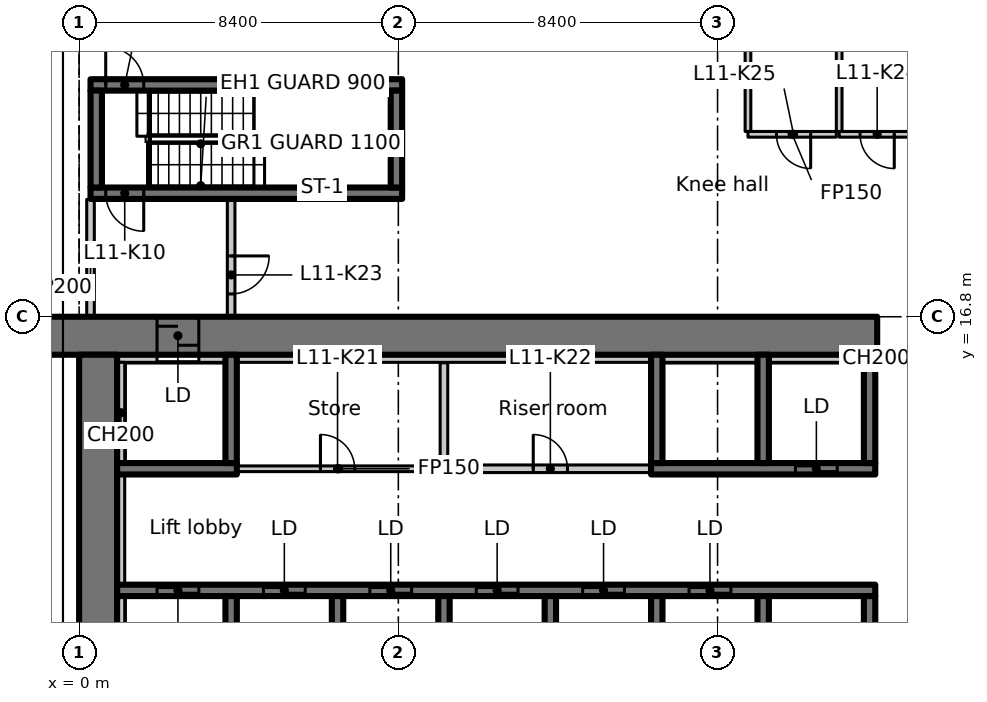
"""IFC4 building model, lengths in metres.
Left out: names, types, materials, properties, quantities, classifications, styles, units other than length and angle.
Written with IfcOpenShell. Run it as: python <this file> out.ifc"""

import sys

from ifc_helpers import new_model, si_unit, direction, frame, frame_2d, origin, place, context, subcontext, project, spatial, rectangle, extrude, element, fill, save


model = new_model("IFC4")
c1 = context("Model", 3, precision=1e-05, world=origin(), true_north=direction((0.0, 1.0)))
c2 = subcontext(c1, "Body", "Model", "MODEL_VIEW")
j1 = project(units=[si_unit("LENGTHUNIT", "METRE"), si_unit("PLANEANGLEUNIT", "RADIAN")], contexts=[c1])
p1 = place(None, origin())
s1 = spatial("IfcSite", under=j1, at=p1, CompositionType="ELEMENT")
p2 = place(p1, origin())
s2 = spatial("IfcBuilding", under=s1, at=p2, CompositionType="ELEMENT")
p3 = place(p2, frame((0.0, 0.0, 54.5)))
s3 = spatial("IfcBuildingStorey", under=s2, at=p3, CompositionType="ELEMENT", Elevation=54.5)
p4 = place(p3, frame((-1.1, 16.3, 0.0), z_axis=(0.0, 0.0, 1.0), x_axis=(1.0, 0.0, 0.0)))
e1 = element("IfcWall", 1, at=p4, inside=s3, PredefinedType="SHEAR", context=c2, shape_type="SweptSolid", body=[
    extrude(rectangle(XDim=22.1, YDim=1.0, at=frame_2d((11.05, 0.0))), origin(), (0.0, 0.0, 1.0), 3.35),
])
p5 = place(p4, frame((3.15, 0.0, 0.0)))
e2 = element("IfcOpeningElement", 2, at=p5, cuts=e1, PredefinedType="OPENING", context=c2, shape_type="SweptSolid", body=[
    extrude(rectangle(XDim=1.1, YDim=2.3, at=frame_2d((0.55, 1.15))), frame((0.0, 0.51, 0.0), z_axis=(0.0, -1.0, 0.0), x_axis=(1.0, 0.0, 0.0)), (0.0, 0.0, 1.0), 1.02),
])
p6 = place(p3, frame((0.5, 6.936, 0.0), z_axis=(0.0, 0.0, 1.0), x_axis=(0.0, 1.0, 0.0)))
e3 = element("IfcWall", 3, at=p6, inside=s3, PredefinedType="SHEAR", context=c2, shape_type="SweptSolid", body=[
    extrude(rectangle(XDim=8.864, YDim=1.0, at=frame_2d((4.432, 0.0))), origin(), (0.0, 0.0, 1.0), 3.35),
])
p7 = place(p3, frame((1.0, 15.7, 0.0), z_axis=(0.0, 0.0, 1.0), x_axis=(1.0, 0.0, 0.0)))
e4 = element("IfcWall", 4, at=p7, inside=s3, PredefinedType="PARTITIONING", context=c2, shape_type="SweptSolid", body=[
    extrude(rectangle(XDim=1.05, YDim=0.2, at=frame_2d((0.525, 0.0))), origin(), (0.0, 0.0, 1.0), 3.35),
])
p8 = place(p3, frame((1.0, 9.6, 0.0), z_axis=(0.0, 0.0, 1.0), x_axis=(1.0, 0.0, 0.0)))
e5 = element("IfcWall", 5, at=p8, inside=s3, PredefinedType="SHEAR", context=c2, shape_type="SweptSolid", body=[
    extrude(rectangle(XDim=19.95, YDim=0.3, at=frame_2d((9.975, 0.0))), origin(), (0.0, 0.0, 1.0), 3.35),
])
p9 = place(p8, frame((1.05, 0.0, 0.0)))
e6 = element("IfcOpeningElement", 6, at=p9, cuts=e5, PredefinedType="OPENING", context=c2, shape_type="SweptSolid", body=[
    extrude(rectangle(XDim=1.1, YDim=2.3, at=frame_2d((0.55, 1.15))), frame((0.0, 0.16, 0.0), z_axis=(0.0, -1.0, 0.0), x_axis=(1.0, 0.0, 0.0)), (0.0, 0.0, 1.0), 0.32),
])
p10 = place(p8, frame((3.85, 0.0, 0.0)))
e7 = element("IfcOpeningElement", 7, at=p10, cuts=e5, PredefinedType="OPENING", context=c2, shape_type="SweptSolid", body=[
    extrude(rectangle(XDim=1.1, YDim=2.3, at=frame_2d((0.55, 1.15))), frame((0.0, 0.16, 0.0), z_axis=(0.0, -1.0, 0.0), x_axis=(1.0, 0.0, 0.0)), (0.0, 0.0, 1.0), 0.32),
])
p11 = place(p8, frame((6.65, 0.0, 0.0)))
e8 = element("IfcOpeningElement", 8, at=p11, cuts=e5, PredefinedType="OPENING", context=c2, shape_type="SweptSolid", body=[
    extrude(rectangle(XDim=1.1, YDim=2.3, at=frame_2d((0.55, 1.15))), frame((0.0, 0.16, 0.0), z_axis=(0.0, -1.0, 0.0), x_axis=(1.0, 0.0, 0.0)), (0.0, 0.0, 1.0), 0.32),
])
p12 = place(p8, frame((9.45, 0.0, 0.0)))
e9 = element("IfcOpeningElement", 9, at=p12, cuts=e5, PredefinedType="OPENING", context=c2, shape_type="SweptSolid", body=[
    extrude(rectangle(XDim=1.1, YDim=2.3, at=frame_2d((0.55, 1.15))), frame((0.0, 0.16, 0.0), z_axis=(0.0, -1.0, 0.0), x_axis=(1.0, 0.0, 0.0)), (0.0, 0.0, 1.0), 0.32),
])
p13 = place(p8, frame((12.25, 0.0, 0.0)))
e10 = element("IfcOpeningElement", 10, at=p13, cuts=e5, PredefinedType="OPENING", context=c2, shape_type="SweptSolid", body=[
    extrude(rectangle(XDim=1.1, YDim=2.3, at=frame_2d((0.55, 1.15))), frame((0.0, 0.16, 0.0), z_axis=(0.0, -1.0, 0.0), x_axis=(1.0, 0.0, 0.0)), (0.0, 0.0, 1.0), 0.32),
])
p14 = place(p8, frame((15.05, 0.0, 0.0)))
e11 = element("IfcOpeningElement", 11, at=p14, cuts=e5, PredefinedType="OPENING", context=c2, shape_type="SweptSolid", body=[
    extrude(rectangle(XDim=1.1, YDim=2.3, at=frame_2d((0.55, 1.15))), frame((0.0, 0.16, 0.0), z_axis=(0.0, -1.0, 0.0), x_axis=(1.0, 0.0, 0.0)), (0.0, 0.0, 1.0), 0.32),
])
for number, where, z_axis, x_axis in (
    (12, (4.0, 7.15, 0.0), (0.0, 0.0, 1.0), (0.0, 1.0, 0.0)),
    (13, (6.8, 7.15, 0.0), (0.0, 0.0, 1.0), (0.0, 1.0, 0.0)),
    (14, (9.6, 7.15, 0.0), (0.0, 0.0, 1.0), (0.0, 1.0, 0.0)),
    (15, (12.4, 7.15, 0.0), (0.0, 0.0, 1.0), (0.0, 1.0, 0.0)),
    (16, (15.2, 7.15, 0.0), (0.0, 0.0, 1.0), (0.0, 1.0, 0.0)),
    (17, (18.0, 7.15, 0.0), (0.0, 0.0, 1.0), (0.0, 1.0, 0.0)),
    (18, (20.8, 7.15, 0.0), (0.0, 0.0, 1.0), (0.0, 1.0, 0.0)),
):
    element("IfcWall", number, at=place(p3, frame(where, z_axis=z_axis, x_axis=x_axis)), inside=s3, PredefinedType="SHEAR", context=c2, shape_type="SweptSolid", body=[
        extrude(rectangle(XDim=2.3, YDim=0.3, at=frame_2d((1.15, 0.0))), origin(), (0.0, 0.0, 1.0), 3.35),
    ])
p15 = place(p3, frame((1.0, 12.8, 0.0), z_axis=(0.0, 0.0, 1.0), x_axis=(1.0, 0.0, 0.0)))
e19 = element("IfcWall", 19, at=p15, inside=s3, PredefinedType="SHEAR", context=c2, shape_type="SweptSolid", body=[
    extrude(rectangle(XDim=3.15, YDim=0.3, at=frame_2d((1.575, 0.0))), origin(), (0.0, 0.0, 1.0), 3.35),
])
p16 = place(p3, frame((4.0, 12.95, 0.0), z_axis=(0.0, 0.0, 1.0), x_axis=(0.0, 1.0, 0.0)))
e20 = element("IfcWall", 20, at=p16, inside=s3, PredefinedType="SHEAR", context=c2, shape_type="SweptSolid", body=[
    extrude(rectangle(XDim=2.85, YDim=0.3, at=frame_2d((1.425, 0.0))), origin(), (0.0, 0.0, 1.0), 3.35),
])
p17 = place(p3, frame((15.05, 12.8, 0.0), z_axis=(0.0, 0.0, 1.0), x_axis=(1.0, 0.0, 0.0)))
e21 = element("IfcWall", 21, at=p17, inside=s3, PredefinedType="SHEAR", context=c2, shape_type="SweptSolid", body=[
    extrude(rectangle(XDim=5.9, YDim=0.3, at=frame_2d((2.95, 0.0))), origin(), (0.0, 0.0, 1.0), 3.35),
])
p18 = place(p17, frame((3.8, 0.0, 0.0)))
e22 = element("IfcOpeningElement", 22, at=p18, cuts=e21, PredefinedType="OPENING", context=c2, shape_type="SweptSolid", body=[
    extrude(rectangle(XDim=1.1, YDim=2.3, at=frame_2d((0.55, 1.15))), frame((0.0, 0.16, 0.0), z_axis=(0.0, -1.0, 0.0), x_axis=(1.0, 0.0, 0.0)), (0.0, 0.0, 1.0), 0.32),
])
for number, where, z_axis, x_axis in (
    (23, (15.2, 12.95, 0.0), (0.0, 0.0, 1.0), (0.0, 1.0, 0.0)),
    (24, (18.0, 12.95, 0.0), (0.0, 0.0, 1.0), (0.0, 1.0, 0.0)),
    (25, (20.8, 12.95, 0.0), (0.0, 0.0, 1.0), (0.0, 1.0, 0.0)),
):
    element("IfcWall", number, at=place(p3, frame(where, z_axis=z_axis, x_axis=x_axis)), inside=s3, PredefinedType="SHEAR", context=c2, shape_type="SweptSolid", body=[
        extrude(rectangle(XDim=2.85, YDim=0.3, at=frame_2d((1.425, 0.0))), origin(), (0.0, 0.0, 1.0), 3.35),
    ])
p19 = place(p3, frame((8.5, 20.05, 0.0), z_axis=(0.0, 0.0, 1.0), x_axis=(-1.0, 0.0, 0.0)))
e26 = element("IfcWall", 26, at=p19, inside=s3, PredefinedType="SHEAR", context=c2, shape_type="SweptSolid", body=[
    extrude(rectangle(XDim=8.2, YDim=0.3, at=frame_2d((4.1, 0.0))), origin(), (0.0, 0.0, 1.0), 3.35),
])
p20 = place(p19, frame((6.8, 0.0, 0.0)))
e27 = element("IfcOpeningElement", 27, at=p20, cuts=e26, PredefinedType="OPENING", context=c2, shape_type="SweptSolid", body=[
    extrude(rectangle(XDim=1.0, YDim=2.1, at=frame_2d((0.5, 1.05))), frame((0.0, 0.16, 0.0), z_axis=(0.0, -1.0, 0.0), x_axis=(1.0, 0.0, 0.0)), (0.0, 0.0, 1.0), 0.32),
])
p21 = place(p3, frame((0.3, 22.9, 0.0), z_axis=(0.0, 0.0, 1.0), x_axis=(1.0, 0.0, 0.0)))
e28 = element("IfcWall", 28, at=p21, inside=s3, PredefinedType="SHEAR", context=c2, shape_type="SweptSolid", body=[
    extrude(rectangle(XDim=8.2, YDim=0.3, at=frame_2d((4.1, 0.0))), origin(), (0.0, 0.0, 1.0), 3.35),
])
p22 = place(p21, frame((0.4, 0.0, 0.0)))
e29 = element("IfcOpeningElement", 29, at=p22, cuts=e28, PredefinedType="OPENING", context=c2, shape_type="SweptSolid", body=[
    extrude(rectangle(XDim=1.0, YDim=2.1, at=frame_2d((0.5, 1.05))), frame((0.0, 0.16, 0.0), z_axis=(0.0, -1.0, 0.0), x_axis=(1.0, 0.0, 0.0)), (0.0, 0.0, 1.0), 0.32),
])
for number, where, z_axis, x_axis in (
    (30, (0.45, 20.2, 0.0), (0.0, 0.0, 1.0), (0.0, 1.0, 0.0)),
    (31, (8.35, 20.2, 0.0), (0.0, 0.0, 1.0), (0.0, 1.0, 0.0)),
):
    element("IfcWall", number, at=place(p3, frame(where, z_axis=z_axis, x_axis=x_axis)), inside=s3, PredefinedType="SHEAR", context=c2, shape_type="SweptSolid", body=[
        extrude(rectangle(XDim=2.55, YDim=0.3, at=frame_2d((1.275, 0.0))), origin(), (0.0, 0.0, 1.0), 3.35),
    ])
p23 = place(p3, frame((0.3, 16.812, 0.0), z_axis=(0.0, 0.0, 1.0), x_axis=(0.0, 1.0, 0.0)))
e32 = element("IfcWall", 32, at=p23, inside=s3, PredefinedType="PARTITIONING", context=c2, shape_type="SweptSolid", body=[
    extrude(rectangle(XDim=3.076, YDim=0.2, at=frame_2d((1.538, 0.0))), origin(), (0.0, 0.0, 1.0), 2.98),
])
p24 = place(p3, frame((4.0, 19.888, 0.0), z_axis=(0.0, 0.0, 1.0), x_axis=(0.0, -1.0, 0.0)))
e33 = element("IfcWall", 33, at=p24, inside=s3, PredefinedType="PARTITIONING", context=c2, shape_type="SweptSolid", body=[
    extrude(rectangle(XDim=3.076, YDim=0.2, at=frame_2d((1.538, 0.0))), origin(), (0.0, 0.0, 1.0), 3.35),
])
p25 = place(p24, frame((1.488, 0.0, 0.0)))
e34 = element("IfcOpeningElement", 34, at=p25, cuts=e33, PredefinedType="OPENING", context=c2, shape_type="SweptSolid", body=[
    extrude(rectangle(XDim=1.0, YDim=2.1, at=frame_2d((0.5, 1.05))), frame((0.0, 0.11, 0.0), z_axis=(0.0, -1.0, 0.0), x_axis=(1.0, 0.0, 0.0)), (0.0, 0.0, 1.0), 0.22),
])
p26 = place(p3, frame((9.6, 15.588, 0.0), z_axis=(0.0, 0.0, 1.0), x_axis=(0.0, -1.0, 0.0)))
e35 = element("IfcWall", 35, at=p26, inside=s3, PredefinedType="PARTITIONING", context=c2, shape_type="SweptSolid", body=[
    extrude(rectangle(XDim=2.788, YDim=0.2, at=frame_2d((1.394, 0.0))), origin(), (0.0, 0.0, 1.0), 3.35),
])
p27 = place(p3, frame((9.7, 12.8, 0.0), z_axis=(0.0, 0.0, 1.0), x_axis=(1.0, 0.0, 0.0)))
e36 = element("IfcWall", 36, at=p27, inside=s3, PredefinedType="PARTITIONING", context=c2, shape_type="SweptSolid", body=[
    extrude(rectangle(XDim=5.338, YDim=0.2, at=frame_2d((2.669, 0.0))), origin(), (0.0, 0.0, 1.0), 3.35),
])
p28 = place(p27, frame((2.25, 0.0, 0.0)))
e37 = element("IfcOpeningElement", 37, at=p28, cuts=e36, PredefinedType="OPENING", context=c2, shape_type="SweptSolid", body=[
    extrude(rectangle(XDim=0.9, YDim=2.1, at=frame_2d((0.45, 1.05))), frame((0.0, 0.11, 0.0), z_axis=(0.0, -1.0, 0.0), x_axis=(1.0, 0.0, 0.0)), (0.0, 0.0, 1.0), 0.22),
])
p29 = place(p3, frame((4.162, 12.8, 0.0), z_axis=(0.0, 0.0, 1.0), x_axis=(1.0, 0.0, 0.0)))
e38 = element("IfcWall", 38, at=p29, inside=s3, PredefinedType="PARTITIONING", context=c2, shape_type="SweptSolid", body=[
    extrude(rectangle(XDim=5.338, YDim=0.15, at=frame_2d((2.669, 0.0))), origin(), (0.0, 0.0, 1.0), 3.35),
])
p30 = place(p29, frame((2.188, 0.0, 0.0)))
e39 = element("IfcOpeningElement", 39, at=p30, cuts=e38, PredefinedType="OPENING", context=c2, shape_type="SweptSolid", body=[
    extrude(rectangle(XDim=0.9, YDim=2.1, at=frame_2d((0.45, 1.05))), frame((0.0, 0.085, 0.0), z_axis=(0.0, -1.0, 0.0), x_axis=(1.0, 0.0, 0.0)), (0.0, 0.0, 1.0), 0.17),
])
p31 = place(p3, frame((21.925, 21.6, 0.0), z_axis=(0.0, 0.0, 1.0), x_axis=(-1.0, 0.0, 0.0)))
e40 = element("IfcWall", 40, at=p31, inside=s3, PredefinedType="PARTITIONING", context=c2, shape_type="SweptSolid", body=[
    extrude(rectangle(XDim=1.925, YDim=0.15, at=frame_2d((0.962, 0.0))), origin(), (0.0, 0.0, 1.0), 3.35),
])
p32 = place(p31, frame((0.475, 0.0, 0.0)))
e41 = element("IfcOpeningElement", 41, at=p32, cuts=e40, PredefinedType="OPENING", context=c2, shape_type="SweptSolid", body=[
    extrude(rectangle(XDim=0.9, YDim=2.1, at=frame_2d((0.45, 1.05))), frame((0.0, 0.085, 0.0), z_axis=(0.0, -1.0, 0.0), x_axis=(1.0, 0.0, 0.0)), (0.0, 0.0, 1.0), 0.17),
])
p33 = place(p3, frame((20.0, 21.675, 0.0), z_axis=(0.0, 0.0, 1.0), x_axis=(0.0, 1.0, 0.0)))
e42 = element("IfcWall", 42, at=p33, inside=s3, PredefinedType="PARTITIONING", context=c2, shape_type="SweptSolid", body=[
    extrude(rectangle(XDim=2.25, YDim=0.15, at=frame_2d((1.125, 0.0))), origin(), (0.0, 0.0, 1.0), 3.35),
])
p34 = place(p3, frame((19.925, 21.6, 0.0), z_axis=(0.0, 0.0, 1.0), x_axis=(-1.0, 0.0, 0.0)))
e43 = element("IfcWall", 43, at=p34, inside=s3, PredefinedType="PARTITIONING", context=c2, shape_type="SweptSolid", body=[
    extrude(rectangle(XDim=2.325, YDim=0.15, at=frame_2d((1.163, 0.0))), origin(), (0.0, 0.0, 1.0), 3.35),
])
p35 = place(p34, frame((0.675, 0.0, 0.0)))
e44 = element("IfcOpeningElement", 44, at=p35, cuts=e43, PredefinedType="OPENING", context=c2, shape_type="SweptSolid", body=[
    extrude(rectangle(XDim=0.9, YDim=2.1, at=frame_2d((0.45, 1.05))), frame((0.0, 0.085, 0.0), z_axis=(0.0, -1.0, 0.0), x_axis=(1.0, 0.0, 0.0)), (0.0, 0.0, 1.0), 0.17),
])
p36 = place(p3, frame((17.6, 21.675, 0.0), z_axis=(0.0, 0.0, 1.0), x_axis=(0.0, 1.0, 0.0)))
e45 = element("IfcWall", 45, at=p36, inside=s3, PredefinedType="PARTITIONING", context=c2, shape_type="SweptSolid", body=[
    extrude(rectangle(XDim=2.325, YDim=0.15, at=frame_2d((1.163, 0.0))), origin(), (0.0, 0.0, 1.0), 3.35),
])
p37 = place(p3, frame((1.1, 7.15, 0.0), z_axis=(0.0, 0.0, 1.0), x_axis=(0.0, 1.0, 0.0)))
e46 = element("IfcWall", 46, at=p37, inside=s3, PredefinedType="PARTITIONING", context=c2, shape_type="SweptSolid", body=[
    extrude(rectangle(XDim=2.3, YDim=0.2, at=frame_2d((1.15, 0.0))), origin(), (0.0, 0.0, 1.0), 3.35),
])
p38 = place(p3, frame((1.1, 9.75, 0.0), z_axis=(0.0, 0.0, 1.0), x_axis=(0.0, 1.0, 0.0)))
e47 = element("IfcWall", 47, at=p38, inside=s3, PredefinedType="PARTITIONING", context=c2, shape_type="SweptSolid", body=[
    extrude(rectangle(XDim=2.9, YDim=0.2, at=frame_2d((1.45, 0.0))), origin(), (0.0, 0.0, 1.0), 3.35),
])
p39 = place(p3, frame((1.1, 12.95, 0.0), z_axis=(0.0, 0.0, 1.0), x_axis=(0.0, 1.0, 0.0)))
e48 = element("IfcWall", 48, at=p39, inside=s3, PredefinedType="PARTITIONING", context=c2, shape_type="SweptSolid", body=[
    extrude(rectangle(XDim=2.65, YDim=0.2, at=frame_2d((1.325, 0.0))), origin(), (0.0, 0.0, 1.0), 3.35),
])
p40 = place(p3, frame((3.15, 15.7, 0.0), z_axis=(0.0, 0.0, 1.0), x_axis=(1.0, 0.0, 0.0)))
e49 = element("IfcWall", 49, at=p40, inside=s3, PredefinedType="PARTITIONING", context=c2, shape_type="SweptSolid", body=[
    extrude(rectangle(XDim=0.7, YDim=0.2, at=frame_2d((0.35, 0.0))), origin(), (0.0, 0.0, 1.0), 3.35),
])
p41 = place(p3, frame((4.15, 15.7, 0.0), z_axis=(0.0, 0.0, 1.0), x_axis=(1.0, 0.0, 0.0)))
e50 = element("IfcWall", 50, at=p41, inside=s3, PredefinedType="PARTITIONING", context=c2, shape_type="SweptSolid", body=[
    extrude(rectangle(XDim=10.9, YDim=0.2, at=frame_2d((5.45, 0.0))), origin(), (0.0, 0.0, 1.0), 3.35),
])
for number, where, z_axis, x_axis in (
    (51, (15.35, 15.7, 0.0), (0.0, 0.0, 1.0), (1.0, 0.0, 0.0)),
    (52, (18.15, 15.7, 0.0), (0.0, 0.0, 1.0), (1.0, 0.0, 0.0)),
):
    element("IfcWall", number, at=place(p3, frame(where, z_axis=z_axis, x_axis=x_axis)), inside=s3, PredefinedType="PARTITIONING", context=c2, shape_type="SweptSolid", body=[
        extrude(rectangle(XDim=2.5, YDim=0.2, at=frame_2d((1.25, 0.0))), origin(), (0.0, 0.0, 1.0), 3.35),
    ])
p42 = place(p3, frame((20.95, 15.7, 0.0), z_axis=(0.0, 0.0, 1.0), x_axis=(1.0, 0.0, 0.0)))
e53 = element("IfcWall", 53, at=p42, inside=s3, PredefinedType="PARTITIONING", context=c2, shape_type="SweptSolid", body=[
    extrude(rectangle(XDim=0.05, YDim=0.2, at=frame_2d((0.025, 0.0))), origin(), (0.0, 0.0, 1.0), 3.35),
])
p43 = place(p9, origin())
e54 = element("IfcDoor", 54, at=p43, inside=s3, OperationType="SLIDING_TO_LEFT", PredefinedType="DOOR", context=c2, shape_type="SweptSolid", body=[
    extrude(rectangle(XDim=1.1, YDim=2.3, at=frame_2d((0.55, 1.15))), frame((0.0, 0.025, 0.0), z_axis=(0.0, -1.0, 0.0), x_axis=(1.0, 0.0, 0.0)), (0.0, 0.0, 1.0), 0.05),
])
fill(e6, e54)
p44 = place(p10, origin())
e55 = element("IfcDoor", 55, at=p44, inside=s3, OperationType="SLIDING_TO_LEFT", PredefinedType="DOOR", context=c2, shape_type="SweptSolid", body=[
    extrude(rectangle(XDim=1.1, YDim=2.3, at=frame_2d((0.55, 1.15))), frame((0.0, 0.025, 0.0), z_axis=(0.0, -1.0, 0.0), x_axis=(1.0, 0.0, 0.0)), (0.0, 0.0, 1.0), 0.05),
])
fill(e7, e55)
p45 = place(p11, origin())
e56 = element("IfcDoor", 56, at=p45, inside=s3, OperationType="SLIDING_TO_LEFT", PredefinedType="DOOR", context=c2, shape_type="SweptSolid", body=[
    extrude(rectangle(XDim=1.1, YDim=2.3, at=frame_2d((0.55, 1.15))), frame((0.0, 0.025, 0.0), z_axis=(0.0, -1.0, 0.0), x_axis=(1.0, 0.0, 0.0)), (0.0, 0.0, 1.0), 0.05),
])
fill(e8, e56)
p46 = place(p12, origin())
e57 = element("IfcDoor", 57, at=p46, inside=s3, OperationType="SLIDING_TO_LEFT", PredefinedType="DOOR", context=c2, shape_type="SweptSolid", body=[
    extrude(rectangle(XDim=1.1, YDim=2.3, at=frame_2d((0.55, 1.15))), frame((0.0, 0.025, 0.0), z_axis=(0.0, -1.0, 0.0), x_axis=(1.0, 0.0, 0.0)), (0.0, 0.0, 1.0), 0.05),
])
fill(e9, e57)
p47 = place(p13, origin())
e58 = element("IfcDoor", 58, at=p47, inside=s3, OperationType="SLIDING_TO_LEFT", PredefinedType="DOOR", context=c2, shape_type="SweptSolid", body=[
    extrude(rectangle(XDim=1.1, YDim=2.3, at=frame_2d((0.55, 1.15))), frame((0.0, 0.025, 0.0), z_axis=(0.0, -1.0, 0.0), x_axis=(1.0, 0.0, 0.0)), (0.0, 0.0, 1.0), 0.05),
])
fill(e10, e58)
p48 = place(p14, origin())
e59 = element("IfcDoor", 59, at=p48, inside=s3, OperationType="SLIDING_TO_LEFT", PredefinedType="DOOR", context=c2, shape_type="SweptSolid", body=[
    extrude(rectangle(XDim=1.1, YDim=2.3, at=frame_2d((0.55, 1.15))), frame((0.0, 0.025, 0.0), z_axis=(0.0, -1.0, 0.0), x_axis=(1.0, 0.0, 0.0)), (0.0, 0.0, 1.0), 0.05),
])
fill(e11, e59)
p49 = place(p5, origin())
e60 = element("IfcDoor", 60, at=p49, inside=s3, OperationType="SLIDING_TO_LEFT", PredefinedType="DOOR", context=c2, shape_type="SweptSolid", body=[
    extrude(rectangle(XDim=1.1, YDim=2.3, at=frame_2d((0.55, 1.15))), frame((0.0, 0.025, 0.0), z_axis=(0.0, -1.0, 0.0), x_axis=(1.0, 0.0, 0.0)), (0.0, 0.0, 1.0), 0.05),
])
fill(e2, e60)
p50 = place(p18, origin())
e61 = element("IfcDoor", 61, at=p50, inside=s3, OperationType="SLIDING_TO_LEFT", PredefinedType="DOOR", context=c2, shape_type="SweptSolid", body=[
    extrude(rectangle(XDim=1.1, YDim=2.3, at=frame_2d((0.55, 1.15))), frame((0.0, 0.025, 0.0), z_axis=(0.0, -1.0, 0.0), x_axis=(1.0, 0.0, 0.0)), (0.0, 0.0, 1.0), 0.05),
])
fill(e22, e61)
p51 = place(p20, origin())
e62 = element("IfcDoor", 62, at=p51, inside=s3, OperationType="SINGLE_SWING_LEFT", PredefinedType="DOOR", context=c2, shape_type="SweptSolid", body=[
    extrude(rectangle(XDim=1.0, YDim=2.1, at=frame_2d((0.5, 1.05))), frame((0.0, 0.025, 0.0), z_axis=(0.0, -1.0, 0.0), x_axis=(1.0, 0.0, 0.0)), (0.0, 0.0, 1.0), 0.05),
])
fill(e27, e62)
p52 = place(p22, origin())
e63 = element("IfcDoor", 63, at=p52, inside=s3, OperationType="SINGLE_SWING_RIGHT", PredefinedType="DOOR", context=c2, shape_type="SweptSolid", body=[
    extrude(rectangle(XDim=1.0, YDim=2.1, at=frame_2d((0.5, 1.05))), frame((0.0, 0.025, 0.0), z_axis=(0.0, -1.0, 0.0), x_axis=(1.0, 0.0, 0.0)), (0.0, 0.0, 1.0), 0.05),
])
fill(e29, e63)
p53 = place(p30, origin())
e64 = element("IfcDoor", 64, at=p53, inside=s3, OperationType="SINGLE_SWING_RIGHT", PredefinedType="DOOR", context=c2, shape_type="SweptSolid", body=[
    extrude(rectangle(XDim=0.9, YDim=2.1, at=frame_2d((0.45, 1.05))), frame((0.0, 0.025, 0.0), z_axis=(0.0, -1.0, 0.0), x_axis=(1.0, 0.0, 0.0)), (0.0, 0.0, 1.0), 0.05),
])
fill(e39, e64)
p54 = place(p28, origin())
e65 = element("IfcDoor", 65, at=p54, inside=s3, OperationType="SINGLE_SWING_LEFT", PredefinedType="DOOR", context=c2, shape_type="SweptSolid", body=[
    extrude(rectangle(XDim=0.9, YDim=2.1, at=frame_2d((0.45, 1.05))), frame((0.0, 0.025, 0.0), z_axis=(0.0, -1.0, 0.0), x_axis=(1.0, 0.0, 0.0)), (0.0, 0.0, 1.0), 0.05),
])
fill(e37, e65)
p55 = place(p25, origin())
e66 = element("IfcDoor", 66, at=p55, inside=s3, OperationType="SINGLE_SWING_RIGHT", PredefinedType="DOOR", context=c2, shape_type="SweptSolid", body=[
    extrude(rectangle(XDim=1.0, YDim=2.1, at=frame_2d((0.5, 1.05))), frame((0.0, 0.025, 0.0), z_axis=(0.0, -1.0, 0.0), x_axis=(1.0, 0.0, 0.0)), (0.0, 0.0, 1.0), 0.05),
])
fill(e34, e66)
p56 = place(p32, origin())
e67 = element("IfcDoor", 67, at=p56, inside=s3, OperationType="SINGLE_SWING_LEFT", PredefinedType="DOOR", context=c2, shape_type="SweptSolid", body=[
    extrude(rectangle(XDim=0.9, YDim=2.1, at=frame_2d((0.45, 1.05))), frame((0.0, 0.025, 0.0), z_axis=(0.0, -1.0, 0.0), x_axis=(1.0, 0.0, 0.0)), (0.0, 0.0, 1.0), 0.05),
])
fill(e41, e67)
p57 = place(p35, origin())
e68 = element("IfcDoor", 68, at=p57, inside=s3, OperationType="SINGLE_SWING_RIGHT", PredefinedType="DOOR", context=c2, shape_type="SweptSolid", body=[
    extrude(rectangle(XDim=0.9, YDim=2.1, at=frame_2d((0.45, 1.05))), frame((0.0, 0.025, 0.0), z_axis=(0.0, -1.0, 0.0), x_axis=(1.0, 0.0, 0.0)), (0.0, 0.0, 1.0), 0.05),
])
fill(e44, e68)
save(model, sys.argv[1])
